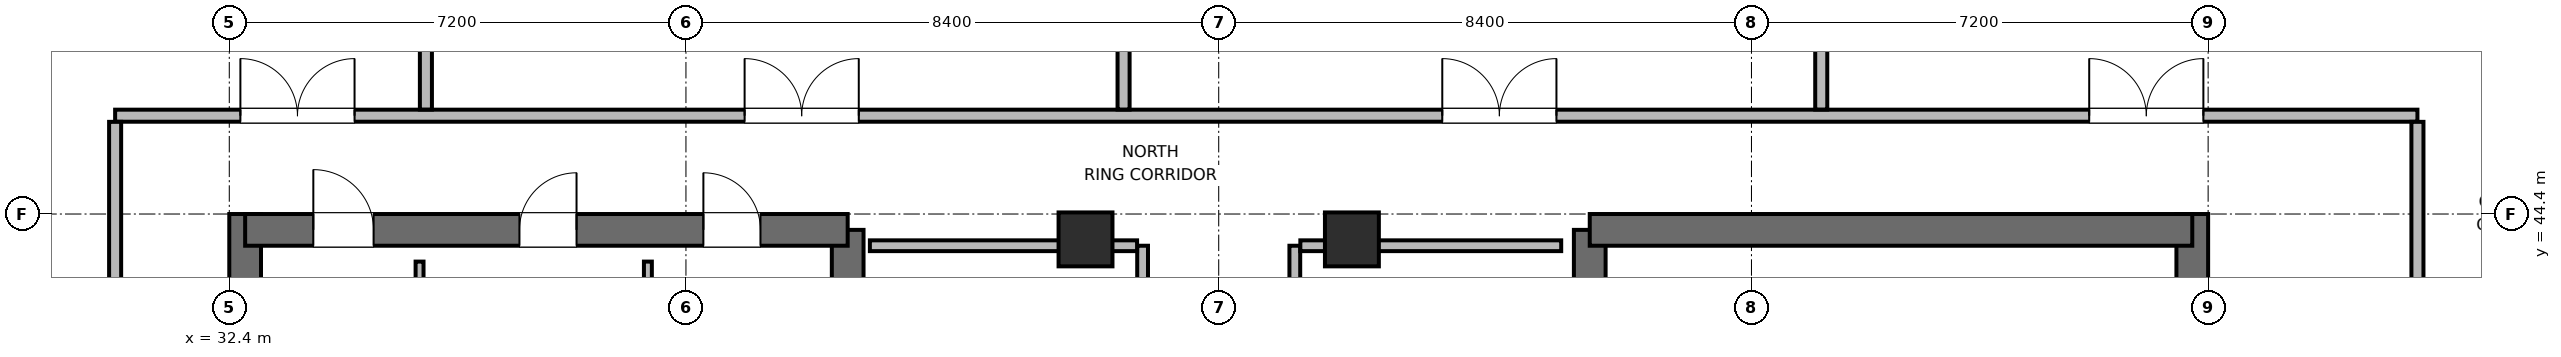
"""IFC4 building model, lengths in metres.
Left out: names, types, materials, properties, quantities, classifications, styles, units other than length and angle.
Written with IfcOpenShell. Run it as: python <this file> out.ifc"""

import sys

from ifc_helpers import new_model, si_unit, direction, frame, frame_2d, origin, origin_2d, place, context, subcontext, project, spatial, rectangle, extrude, element, fill, save


model = new_model("IFC4")
c1 = context("Model", 3, precision=1e-05, world=origin(), true_north=direction((0.0, 1.0)))
c2 = subcontext(c1, "Body", "Model", "MODEL_VIEW")
j1 = project(units=[si_unit("LENGTHUNIT", "METRE"), si_unit("PLANEANGLEUNIT", "RADIAN")], contexts=[c1])
p1 = place(None, origin())
s1 = spatial("IfcSite", under=j1, at=p1, CompositionType="ELEMENT")
p2 = place(p1, origin())
s2 = spatial("IfcBuilding", under=s1, at=p2, CompositionType="ELEMENT")
p3 = place(p2, frame((0.0, 0.0, 325.8)))
s3 = spatial("IfcBuildingStorey", under=s2, at=p3, CompositionType="ELEMENT", Elevation=325.8)
p4 = place(p3, frame((32.65, 27.6, 0.0), z_axis=(0.0, 0.0, 1.0), x_axis=(0.0, 1.0, 0.0)))
e1 = element("IfcWall", 1, at=p4, inside=s3, PredefinedType="SHEAR", context=c2, shape_type="SweptSolid", body=[
    extrude(rectangle(XDim=16.8, YDim=0.5, at=frame_2d((8.4, 0.0))), origin(), (0.0, 0.0, 1.0), 3.9),
])
p5 = place(p3, frame((42.15, 37.8, 0.0), z_axis=(0.0, 0.0, 1.0), x_axis=(0.0, 1.0, 0.0)))
e2 = element("IfcWall", 2, at=p5, inside=s3, PredefinedType="SHEAR", context=c2, shape_type="SweptSolid", body=[
    extrude(rectangle(XDim=6.35, YDim=0.5, at=frame_2d((3.175, 0.0))), origin(), (0.0, 0.0, 1.0), 3.9),
])
p6 = place(p3, frame((32.65, 44.15, 0.0), z_axis=(0.0, 0.0, 1.0), x_axis=(1.0, 0.0, 0.0)))
e3 = element("IfcWall", 3, at=p6, inside=s3, PredefinedType="SHEAR", context=c2, shape_type="SweptSolid", body=[
    extrude(rectangle(XDim=9.5, YDim=0.5, at=frame_2d((4.75, 0.0))), origin(), (0.0, 0.0, 1.0), 3.9),
])
p7 = place(p6, frame((1.075, 0.0, 0.0)))
e4 = element("IfcOpeningElement", 4, at=p7, cuts=e3, PredefinedType="OPENING", context=c2, shape_type="SweptSolid", body=[
    extrude(rectangle(XDim=0.95, YDim=2.04, at=frame_2d((0.475, 1.02))), frame((0.0, 0.26, 0.0), z_axis=(0.0, -1.0, 0.0), x_axis=(1.0, 0.0, 0.0)), (0.0, 0.0, 1.0), 0.52),
])
p8 = place(p6, frame((4.325, 0.0, 0.0)))
e5 = element("IfcOpeningElement", 5, at=p8, cuts=e3, PredefinedType="OPENING", context=c2, shape_type="SweptSolid", body=[
    extrude(rectangle(XDim=0.9, YDim=2.02, at=frame_2d((0.45, 1.01))), frame((0.0, 0.26, 0.0), z_axis=(0.0, -1.0, 0.0), x_axis=(1.0, 0.0, 0.0)), (0.0, 0.0, 1.0), 0.52),
])
p9 = place(p6, frame((7.225, 0.0, 0.0)))
e6 = element("IfcOpeningElement", 6, at=p9, cuts=e3, PredefinedType="OPENING", context=c2, shape_type="SweptSolid", body=[
    extrude(rectangle(XDim=0.9, YDim=2.02, at=frame_2d((0.45, 1.01))), frame((0.0, 0.26, 0.0), z_axis=(0.0, -1.0, 0.0), x_axis=(1.0, 0.0, 0.0)), (0.0, 0.0, 1.0), 0.52),
])
p10 = place(p3, frame((53.85, 38.0, 0.0), z_axis=(0.0, 0.0, 1.0), x_axis=(0.0, 1.0, 0.0)))
e7 = element("IfcWall", 7, at=p10, inside=s3, PredefinedType="SHEAR", context=c2, shape_type="SweptSolid", body=[
    extrude(rectangle(XDim=6.15, YDim=0.5, at=frame_2d((3.075, 0.0))), origin(), (0.0, 0.0, 1.0), 3.9),
])
p11 = place(p3, frame((63.35, 27.6, 0.0), z_axis=(0.0, 0.0, 1.0), x_axis=(0.0, 1.0, 0.0)))
e8 = element("IfcWall", 8, at=p11, inside=s3, PredefinedType="SHEAR", context=c2, shape_type="SweptSolid", body=[
    extrude(rectangle(XDim=16.8, YDim=0.5, at=frame_2d((8.4, 0.0))), origin(), (0.0, 0.0, 1.0), 3.9),
])
p12 = place(p3, frame((53.85, 44.15, 0.0), z_axis=(0.0, 0.0, 1.0), x_axis=(1.0, 0.0, 0.0)))
e9 = element("IfcWall", 9, at=p12, inside=s3, PredefinedType="SHEAR", context=c2, shape_type="SweptSolid", body=[
    extrude(rectangle(XDim=9.5, YDim=0.5, at=frame_2d((4.75, 0.0))), origin(), (0.0, 0.0, 1.0), 3.9),
])
for number, where, z_axis, x_axis in (
    (10, (45.9, 44.0, 0.0), (0.0, 0.0, 1.0), (1.0, 0.0, 0.0)),
    (11, (50.1, 44.0, 0.0), (0.0, 0.0, 1.0), (1.0, 0.0, 0.0)),
):
    element("IfcColumn", number, at=place(p3, frame(where, z_axis=z_axis, x_axis=x_axis)), inside=s3, PredefinedType="COLUMN", context=c2, shape_type="SweptSolid", body=[
        extrude(rectangle(XDim=0.85, YDim=0.85, at=origin_2d()), origin(), (0.0, 0.0, 1.0), 3.9),
    ])
for number, where, z_axis, x_axis in (
    (12, (35.4, 41.095, 0.0), (0.0, 0.0, 1.0), (0.0, 1.0, 0.0)),
    (13, (39.0, 41.095, 0.0), (0.0, 0.0, 1.0), (0.0, 1.0, 0.0)),
):
    element("IfcWall", number, at=place(p3, frame(where, z_axis=z_axis, x_axis=x_axis)), inside=s3, PredefinedType="PARTITIONING", context=c2, shape_type="SweptSolid", body=[
        extrude(rectangle(XDim=2.555, YDim=0.125, at=frame_2d((1.277, 0.0))), origin(), (0.0, 0.0, 1.0), 3.68),
    ])
p13 = place(p3, frame((46.8, 37.9, 0.0), z_axis=(0.0, 0.0, 1.0), x_axis=(0.0, 1.0, 0.0)))
e14 = element("IfcWall", 14, at=p13, inside=s3, PredefinedType="PARTITIONING", context=c2, shape_type="SweptSolid", body=[
    extrude(rectangle(XDim=6.0, YDim=0.17, at=frame_2d((3.0, 0.0))), origin(), (0.0, 0.0, 1.0), 3.68),
])
p14 = place(p13, frame((0.54, 0.0, 0.0)))
e15 = element("IfcOpeningElement", 15, at=p14, cuts=e14, PredefinedType="OPENING", context=c2, shape_type="SweptSolid", body=[
    extrude(rectangle(XDim=0.9, YDim=2.02, at=frame_2d((0.45, 1.01))), frame((0.0, 0.095, 0.0), z_axis=(0.0, -1.0, 0.0), x_axis=(1.0, 0.0, 0.0)), (0.0, 0.0, 1.0), 0.19),
])
p15 = place(p13, frame((2.55, 0.0, 0.0)))
e16 = element("IfcOpeningElement", 16, at=p15, cuts=e14, PredefinedType="OPENING", context=c2, shape_type="SweptSolid", body=[
    extrude(rectangle(XDim=0.9, YDim=2.02, at=frame_2d((0.45, 1.01))), frame((0.0, 0.095, 0.0), z_axis=(0.0, -1.0, 0.0), x_axis=(1.0, 0.0, 0.0)), (0.0, 0.0, 1.0), 0.19),
])
p16 = place(p13, frame((4.56, 0.0, 0.0)))
e17 = element("IfcOpeningElement", 17, at=p16, cuts=e14, PredefinedType="OPENING", context=c2, shape_type="SweptSolid", body=[
    extrude(rectangle(XDim=0.9, YDim=2.02, at=frame_2d((0.45, 1.01))), frame((0.0, 0.095, 0.0), z_axis=(0.0, -1.0, 0.0), x_axis=(1.0, 0.0, 0.0)), (0.0, 0.0, 1.0), 0.19),
])
p17 = place(p3, frame((42.5, 43.9, 0.0), z_axis=(0.0, 0.0, 1.0), x_axis=(1.0, 0.0, 0.0)))
e18 = element("IfcWall", 18, at=p17, inside=s3, PredefinedType="PARTITIONING", context=c2, shape_type="SweptSolid", body=[
    extrude(rectangle(XDim=4.213, YDim=0.17, at=frame_2d((2.106, 0.0))), origin(), (0.0, 0.0, 1.0), 2.765),
])
p18 = place(p3, frame((49.2, 37.9, 0.0), z_axis=(0.0, 0.0, 1.0), x_axis=(0.0, 1.0, 0.0)))
e19 = element("IfcWall", 19, at=p18, inside=s3, PredefinedType="PARTITIONING", context=c2, shape_type="SweptSolid", body=[
    extrude(rectangle(XDim=6.0, YDim=0.17, at=frame_2d((3.0, 0.0))), origin(), (0.0, 0.0, 1.0), 3.68),
])
p19 = place(p18, frame((0.69, 0.0, 0.0)))
e20 = element("IfcOpeningElement", 20, at=p19, cuts=e19, PredefinedType="OPENING", context=c2, shape_type="SweptSolid", body=[
    extrude(rectangle(XDim=0.9, YDim=2.02, at=frame_2d((0.45, 1.01))), frame((0.0, 0.095, 0.0), z_axis=(0.0, -1.0, 0.0), x_axis=(1.0, 0.0, 0.0)), (0.0, 0.0, 1.0), 0.19),
])
p20 = place(p18, frame((3.69, 0.0, 0.0)))
e21 = element("IfcOpeningElement", 21, at=p20, cuts=e19, PredefinedType="OPENING", context=c2, shape_type="SweptSolid", body=[
    extrude(rectangle(XDim=0.9, YDim=2.02, at=frame_2d((0.45, 1.01))), frame((0.0, 0.095, 0.0), z_axis=(0.0, -1.0, 0.0), x_axis=(1.0, 0.0, 0.0)), (0.0, 0.0, 1.0), 0.19),
])
p21 = place(p3, frame((49.287, 43.9, 0.0), z_axis=(0.0, 0.0, 1.0), x_axis=(1.0, 0.0, 0.0)))
e22 = element("IfcWall", 22, at=p21, inside=s3, PredefinedType="PARTITIONING", context=c2, shape_type="SweptSolid", body=[
    extrude(rectangle(XDim=4.113, YDim=0.17, at=frame_2d((2.056, 0.0))), origin(), (0.0, 0.0, 1.0), 2.765),
])
p22 = place(p3, frame((30.6, 45.95, 0.0), z_axis=(0.0, 0.0, 1.0), x_axis=(1.0, 0.0, 0.0)))
e23 = element("IfcWall", 23, at=p22, inside=s3, PredefinedType="PLUMBINGWALL", context=c2, shape_type="SweptSolid", body=[
    extrude(rectangle(XDim=36.3, YDim=0.19, at=frame_2d((18.15, 0.0))), origin(), (0.0, 0.0, 1.0), 3.68),
])
p23 = place(p22, frame((1.975, 0.0, 0.0)))
e24 = element("IfcOpeningElement", 24, at=p23, cuts=e23, PredefinedType="OPENING", context=c2, shape_type="SweptSolid", body=[
    extrude(rectangle(XDim=1.8, YDim=2.06, at=frame_2d((0.9, 1.03))), frame((0.0, 0.105, 0.0), z_axis=(0.0, -1.0, 0.0), x_axis=(1.0, 0.0, 0.0)), (0.0, 0.0, 1.0), 0.21),
])
p24 = place(p22, frame((9.925, 0.0, 0.0)))
e25 = element("IfcOpeningElement", 25, at=p24, cuts=e23, PredefinedType="OPENING", context=c2, shape_type="SweptSolid", body=[
    extrude(rectangle(XDim=1.8, YDim=2.06, at=frame_2d((0.9, 1.03))), frame((0.0, 0.105, 0.0), z_axis=(0.0, -1.0, 0.0), x_axis=(1.0, 0.0, 0.0)), (0.0, 0.0, 1.0), 0.21),
])
p25 = place(p22, frame((20.925, 0.0, 0.0)))
e26 = element("IfcOpeningElement", 26, at=p25, cuts=e23, PredefinedType="OPENING", context=c2, shape_type="SweptSolid", body=[
    extrude(rectangle(XDim=1.8, YDim=2.06, at=frame_2d((0.9, 1.03))), frame((0.0, 0.105, 0.0), z_axis=(0.0, -1.0, 0.0), x_axis=(1.0, 0.0, 0.0)), (0.0, 0.0, 1.0), 0.21),
])
p26 = place(p22, frame((31.125, 0.0, 0.0)))
e27 = element("IfcOpeningElement", 27, at=p26, cuts=e23, PredefinedType="OPENING", context=c2, shape_type="SweptSolid", body=[
    extrude(rectangle(XDim=1.8, YDim=2.06, at=frame_2d((0.9, 1.03))), frame((0.0, 0.105, 0.0), z_axis=(0.0, -1.0, 0.0), x_axis=(1.0, 0.0, 0.0)), (0.0, 0.0, 1.0), 0.21),
])
p27 = place(p3, frame((30.6, 26.147, 0.0), z_axis=(0.0, 0.0, 1.0), x_axis=(0.0, 1.0, 0.0)))
e28 = element("IfcWall", 28, at=p27, inside=s3, PredefinedType="PLUMBINGWALL", context=c2, shape_type="SweptSolid", body=[
    extrude(rectangle(XDim=19.706, YDim=0.19, at=frame_2d((9.853, 0.0))), origin(), (0.0, 0.0, 1.0), 3.68),
])
p28 = place(p27, frame((4.003, 0.0, 0.0)))
e29 = element("IfcOpeningElement", 29, at=p28, cuts=e28, PredefinedType="OPENING", context=c2, shape_type="SweptSolid", body=[
    extrude(rectangle(XDim=0.95, YDim=2.04, at=frame_2d((0.475, 1.02))), frame((0.0, 0.105, 0.0), z_axis=(0.0, -1.0, 0.0), x_axis=(1.0, 0.0, 0.0)), (0.0, 0.0, 1.0), 0.21),
])
p29 = place(p27, frame((13.953, 0.0, 0.0)))
e30 = element("IfcOpeningElement", 30, at=p29, cuts=e28, PredefinedType="OPENING", context=c2, shape_type="SweptSolid", body=[
    extrude(rectangle(XDim=0.95, YDim=2.04, at=frame_2d((0.475, 1.02))), frame((0.0, 0.105, 0.0), z_axis=(0.0, -1.0, 0.0), x_axis=(1.0, 0.0, 0.0)), (0.0, 0.0, 1.0), 0.21),
])
p30 = place(p3, frame((66.9, 26.147, 0.0), z_axis=(0.0, 0.0, 1.0), x_axis=(0.0, 1.0, 0.0)))
e31 = element("IfcWall", 31, at=p30, inside=s3, PredefinedType="PLUMBINGWALL", context=c2, shape_type="SweptSolid", body=[
    extrude(rectangle(XDim=19.706, YDim=0.19, at=frame_2d((9.853, 0.0))), origin(), (0.0, 0.0, 1.0), 3.68),
])
p31 = place(p30, frame((5.003, 0.0, 0.0)))
e32 = element("IfcOpeningElement", 32, at=p31, cuts=e31, PredefinedType="OPENING", context=c2, shape_type="SweptSolid", body=[
    extrude(rectangle(XDim=0.95, YDim=2.04, at=frame_2d((0.475, 1.02))), frame((0.0, 0.105, 0.0), z_axis=(0.0, -1.0, 0.0), x_axis=(1.0, 0.0, 0.0)), (0.0, 0.0, 1.0), 0.21),
])
p32 = place(p30, frame((14.953, 0.0, 0.0)))
e33 = element("IfcOpeningElement", 33, at=p32, cuts=e31, PredefinedType="OPENING", context=c2, shape_type="SweptSolid", body=[
    extrude(rectangle(XDim=0.95, YDim=2.04, at=frame_2d((0.475, 1.02))), frame((0.0, 0.105, 0.0), z_axis=(0.0, -1.0, 0.0), x_axis=(1.0, 0.0, 0.0)), (0.0, 0.0, 1.0), 0.21),
])
p33 = place(p3, frame((35.5, 46.047, 0.0), z_axis=(0.0, 0.0, 1.0), x_axis=(0.0, 1.0, 0.0)))
e34 = element("IfcWall", 34, at=p33, inside=s3, PredefinedType="PLUMBINGWALL", context=c2, shape_type="SweptSolid", body=[
    extrude(rectangle(XDim=7.118, YDim=0.19, at=frame_2d((3.559, 0.0))), origin(), (0.0, 0.0, 1.0), 3.68),
])
p34 = place(p3, frame((46.5, 46.047, 0.0), z_axis=(0.0, 0.0, 1.0), x_axis=(0.0, 1.0, 0.0)))
e35 = element("IfcWall", 35, at=p34, inside=s3, PredefinedType="PLUMBINGWALL", context=c2, shape_type="SweptSolid", body=[
    extrude(rectangle(XDim=5.878, YDim=0.19, at=frame_2d((2.939, 0.0))), origin(), (0.0, 0.0, 1.0), 3.68),
])
p35 = place(p3, frame((57.5, 46.047, 0.0), z_axis=(0.0, 0.0, 1.0), x_axis=(0.0, 1.0, 0.0)))
e36 = element("IfcWall", 36, at=p35, inside=s3, PredefinedType="PLUMBINGWALL", context=c2, shape_type="SweptSolid", body=[
    extrude(rectangle(XDim=7.078, YDim=0.19, at=frame_2d((3.539, 0.0))), origin(), (0.0, 0.0, 1.0), 3.68),
])
p36 = place(p7, origin())
e37 = element("IfcDoor", 37, at=p36, inside=s3, OperationType="SINGLE_SWING_LEFT", PredefinedType="DOOR", context=c2, shape_type="SweptSolid", body=[
    extrude(rectangle(XDim=0.95, YDim=2.04, at=frame_2d((0.475, 1.02))), frame((0.0, 0.025, 0.0), z_axis=(0.0, -1.0, 0.0), x_axis=(1.0, 0.0, 0.0)), (0.0, 0.0, 1.0), 0.05),
])
fill(e4, e37)
p37 = place(p8, origin())
e38 = element("IfcDoor", 38, at=p37, inside=s3, OperationType="SINGLE_SWING_RIGHT", PredefinedType="DOOR", context=c2, shape_type="SweptSolid", body=[
    extrude(rectangle(XDim=0.9, YDim=2.02, at=frame_2d((0.45, 1.01))), frame((0.0, 0.025, 0.0), z_axis=(0.0, -1.0, 0.0), x_axis=(1.0, 0.0, 0.0)), (0.0, 0.0, 1.0), 0.05),
])
fill(e5, e38)
p38 = place(p9, origin())
e39 = element("IfcDoor", 39, at=p38, inside=s3, OperationType="SINGLE_SWING_LEFT", PredefinedType="DOOR", context=c2, shape_type="SweptSolid", body=[
    extrude(rectangle(XDim=0.9, YDim=2.02, at=frame_2d((0.45, 1.01))), frame((0.0, 0.025, 0.0), z_axis=(0.0, -1.0, 0.0), x_axis=(1.0, 0.0, 0.0)), (0.0, 0.0, 1.0), 0.05),
])
fill(e6, e39)
p39 = place(p23, origin())
e40 = element("IfcDoor", 40, at=p39, inside=s3, OperationType="DOUBLE_DOOR_SINGLE_SWING", PredefinedType="DOOR", context=c2, shape_type="SweptSolid", body=[
    extrude(rectangle(XDim=1.8, YDim=2.06, at=frame_2d((0.9, 1.03))), frame((0.0, 0.025, 0.0), z_axis=(0.0, -1.0, 0.0), x_axis=(1.0, 0.0, 0.0)), (0.0, 0.0, 1.0), 0.05),
])
fill(e24, e40)
p40 = place(p24, origin())
e41 = element("IfcDoor", 41, at=p40, inside=s3, OperationType="DOUBLE_DOOR_SINGLE_SWING", PredefinedType="DOOR", context=c2, shape_type="SweptSolid", body=[
    extrude(rectangle(XDim=1.8, YDim=2.06, at=frame_2d((0.9, 1.03))), frame((0.0, 0.025, 0.0), z_axis=(0.0, -1.0, 0.0), x_axis=(1.0, 0.0, 0.0)), (0.0, 0.0, 1.0), 0.05),
])
fill(e25, e41)
p41 = place(p25, origin())
e42 = element("IfcDoor", 42, at=p41, inside=s3, OperationType="DOUBLE_DOOR_SINGLE_SWING", PredefinedType="DOOR", context=c2, shape_type="SweptSolid", body=[
    extrude(rectangle(XDim=1.8, YDim=2.06, at=frame_2d((0.9, 1.03))), frame((0.0, 0.025, 0.0), z_axis=(0.0, -1.0, 0.0), x_axis=(1.0, 0.0, 0.0)), (0.0, 0.0, 1.0), 0.05),
])
fill(e26, e42)
p42 = place(p26, origin())
e43 = element("IfcDoor", 43, at=p42, inside=s3, OperationType="DOUBLE_DOOR_SINGLE_SWING", PredefinedType="DOOR", context=c2, shape_type="SweptSolid", body=[
    extrude(rectangle(XDim=1.8, YDim=2.06, at=frame_2d((0.9, 1.03))), frame((0.0, 0.025, 0.0), z_axis=(0.0, -1.0, 0.0), x_axis=(1.0, 0.0, 0.0)), (0.0, 0.0, 1.0), 0.05),
])
fill(e27, e43)
save(model, sys.argv[1])
